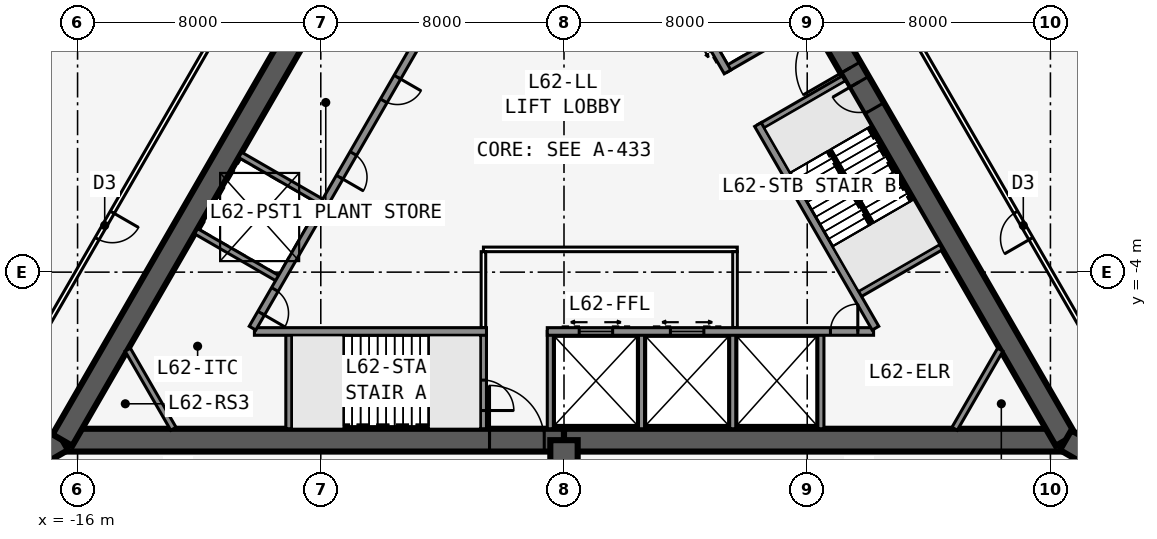
"""IFC4 building model, lengths in metres.
Left out: names, types, materials, properties, quantities, classifications, styles, units other than length and angle.
Written with IfcOpenShell. Run it as: python <this file> out.ifc"""

import sys

from ifc_helpers import new_model, si_unit, direction, frame, frame_2d, origin, place, context, subcontext, project, spatial, rectangle, extrude, element, fill, save


model = new_model("IFC4")
c1 = context("Model", 3, precision=1e-05, world=origin(), true_north=direction((0.0, 1.0)))
c2 = subcontext(c1, "Body", "Model", "MODEL_VIEW")
j1 = project(units=[si_unit("LENGTHUNIT", "METRE"), si_unit("PLANEANGLEUNIT", "RADIAN")], contexts=[c1])
p1 = place(None, origin())
s1 = spatial("IfcSite", under=j1, at=p1, CompositionType="ELEMENT")
p2 = place(p1, origin())
s2 = spatial("IfcBuilding", under=s1, at=p2, CompositionType="ELEMENT")
p3 = place(p2, frame((0.0, 0.0, 233.3)))
s3 = spatial("IfcBuildingStorey", under=s2, at=p3, CompositionType="ELEMENT", Elevation=233.3)
p4 = place(p3, frame((-16.5, -9.526, 0.0), z_axis=(0.0, 0.0, 1.0), x_axis=(1.0, 0.0, 0.0)))
e1 = element("IfcWall", 1, at=p4, inside=s3, PredefinedType="SHEAR", context=c2, shape_type="SweptSolid", body=[
    extrude(rectangle(XDim=16.5, YDim=0.75, at=frame_2d((8.25, 0.0))), origin(), (0.0, 0.0, 1.0), 6.0),
])
p5 = place(p4, frame((14.05, 0.0, 0.0)))
e2 = element("IfcOpeningElement", 2, at=p5, cuts=e1, PredefinedType="OPENING", context=c2, shape_type="SweptSolid", body=[
    extrude(rectangle(XDim=1.8, YDim=2.13, at=frame_2d((0.9, 1.065))), frame((0.0, 0.385, 0.0), z_axis=(0.0, -1.0, 0.0), x_axis=(1.0, 0.0, 0.0)), (0.0, 0.0, 1.0), 0.77),
])
p6 = place(p3, frame((0.0, -9.526, 0.0), z_axis=(0.0, 0.0, 1.0), x_axis=(1.0, 0.0, 0.0)))
e3 = element("IfcWall", 3, at=p6, inside=s3, PredefinedType="SHEAR", context=c2, shape_type="SweptSolid", body=[
    extrude(rectangle(XDim=16.5, YDim=0.75, at=frame_2d((8.25, 0.0))), origin(), (0.0, 0.0, 1.0), 6.0),
])
p7 = place(p3, frame((-10.183, -5.951, 0.0), z_axis=(0.0, 0.0, 1.0), x_axis=(1.0, 0.0, 0.0)))
e4 = element("IfcWall", 4, at=p7, inside=s3, PredefinedType="SOLIDWALL", context=c2, shape_type="SweptSolid", body=[
    extrude(rectangle(XDim=7.633, YDim=0.25, at=frame_2d((3.816, 0.0))), origin(), (0.0, 0.0, 1.0), 5.75),
])
p8 = place(p3, frame((-0.55, -5.951, 0.0), z_axis=(0.0, 0.0, 1.0), x_axis=(1.0, 0.0, 0.0)))
e5 = element("IfcWall", 5, at=p8, inside=s3, PredefinedType="SOLIDWALL", context=c2, shape_type="SweptSolid", body=[
    extrude(rectangle(XDim=10.733, YDim=0.25, at=frame_2d((5.366, 0.0))), origin(), (0.0, 0.0, 1.0), 5.75),
])
p9 = place(p8, frame((9.314, 0.0, 0.0)))
e6 = element("IfcOpeningElement", 6, at=p9, cuts=e5, PredefinedType="OPENING", context=c2, shape_type="SweptSolid", body=[
    extrude(rectangle(XDim=0.9, YDim=2.13, at=frame_2d((0.45, 1.065))), frame((0.0, 0.135, 0.0), z_axis=(0.0, -1.0, 0.0), x_axis=(1.0, 0.0, 0.0)), (0.0, 0.0, 1.0), 0.27),
])
p10 = place(p8, frame((1.05, 0.0, 0.0)))
e7 = element("IfcOpeningElement", 7, at=p10, cuts=e5, PredefinedType="OPENING", context=c2, shape_type="SweptSolid", body=[
    extrude(rectangle(XDim=1.1, YDim=2.13, at=frame_2d((0.55, 1.065))), frame((0.0, 0.135, 0.0), z_axis=(0.0, -1.0, 0.0), x_axis=(1.0, 0.0, 0.0)), (0.0, 0.0, 1.0), 0.27),
])
p11 = place(p8, frame((4.05, 0.0, 0.0)))
e8 = element("IfcOpeningElement", 8, at=p11, cuts=e5, PredefinedType="OPENING", context=c2, shape_type="SweptSolid", body=[
    extrude(rectangle(XDim=1.1, YDim=2.13, at=frame_2d((0.55, 1.065))), frame((0.0, 0.135, 0.0), z_axis=(0.0, -1.0, 0.0), x_axis=(1.0, 0.0, 0.0)), (0.0, 0.0, 1.0), 0.27),
])
p12 = place(p3, frame((-9.05, -5.951, 0.0), z_axis=(0.0, 0.0, 1.0), x_axis=(0.0, -1.0, 0.0)))
e9 = element("IfcWall", 9, at=p12, inside=s3, PredefinedType="SOLIDWALL", context=c2, shape_type="SweptSolid", body=[
    extrude(rectangle(XDim=3.2, YDim=0.2, at=frame_2d((1.6, 0.0))), origin(), (0.0, 0.0, 1.0), 5.75),
])
p13 = place(p3, frame((-2.65, -5.951, 0.0), z_axis=(0.0, 0.0, 1.0), x_axis=(0.0, -1.0, 0.0)))
e10 = element("IfcWall", 10, at=p13, inside=s3, PredefinedType="SOLIDWALL", context=c2, shape_type="SweptSolid", body=[
    extrude(rectangle(XDim=3.2, YDim=0.2, at=frame_2d((1.6, 0.0))), origin(), (0.0, 0.0, 1.0), 5.75),
])
p14 = place(p13, frame((1.6, 0.0, 0.0)))
e11 = element("IfcOpeningElement", 11, at=p14, cuts=e10, PredefinedType="OPENING", context=c2, shape_type="SweptSolid", body=[
    extrude(rectangle(XDim=1.0, YDim=2.13, at=frame_2d((0.5, 1.065))), frame((0.0, 0.11, 0.0), z_axis=(0.0, -1.0, 0.0), x_axis=(1.0, 0.0, 0.0)), (0.0, 0.0, 1.0), 0.22),
])
for number, where, z_axis, x_axis in (
    (12, (-0.45, -5.951, 0.0), (0.0, 0.0, 1.0), (0.0, -1.0, 0.0)),
    (13, (2.55, -5.951, 0.0), (0.0, 0.0, 1.0), (0.0, -1.0, 0.0)),
    (14, (5.55, -5.951, 0.0), (0.0, 0.0, 1.0), (0.0, -1.0, 0.0)),
    (15, (8.45, -5.951, 0.0), (0.0, 0.0, 1.0), (0.0, -1.0, 0.0)),
):
    element("IfcWall", number, at=place(p3, frame(where, z_axis=z_axis, x_axis=x_axis)), inside=s3, PredefinedType="SOLIDWALL", context=c2, shape_type="SweptSolid", body=[
        extrude(rectangle(XDim=3.2, YDim=0.2, at=frame_2d((1.6, 0.0))), origin(), (0.0, 0.0, 1.0), 5.75),
    ])
p15 = place(p3, frame((16.5, -9.526, 0.0), z_axis=(0.0, 0.0, 1.0), x_axis=(-0.499996545922, 0.866027397988, 0.0)))
e16 = element("IfcWall", 16, at=p15, inside=s3, PredefinedType="SHEAR", context=c2, shape_type="SweptSolid", body=[
    extrude(rectangle(XDim=16.5, YDim=0.75, at=frame_2d((8.25, 0.0))), origin(), (0.0, 0.0, 1.0), 6.0),
])
p16 = place(p15, frame((14.15, 0.0, 0.0)))
e17 = element("IfcOpeningElement", 17, at=p16, cuts=e16, PredefinedType="OPENING", context=c2, shape_type="SweptSolid", body=[
    extrude(rectangle(XDim=1.8, YDim=2.13, at=frame_2d((0.9, 1.065))), frame((0.0, 0.385, 0.0), z_axis=(0.0, -1.0, 0.0), x_axis=(1.0, 0.0, 0.0)), (0.0, 0.0, 1.0), 0.77),
])
p17 = place(p15, frame((12.6, 0.0, 0.0)))
e18 = element("IfcOpeningElement", 18, at=p17, cuts=e16, PredefinedType="OPENING", context=c2, shape_type="SweptSolid", body=[
    extrude(rectangle(XDim=1.0, YDim=2.13, at=frame_2d((0.5, 1.065))), frame((0.0, 0.385, 0.0), z_axis=(0.0, -1.0, 0.0), x_axis=(1.0, 0.0, 0.0)), (0.0, 0.0, 1.0), 0.77),
])
p18 = place(p3, frame((10.245, -5.843, 0.0), z_axis=(0.0, 0.0, 1.0), x_axis=(-0.499993009313, 0.866029439822, 0.0)))
e19 = element("IfcWall", 19, at=p18, inside=s3, PredefinedType="SOLIDWALL", context=c2, shape_type="SweptSolid", body=[
    extrude(rectangle(XDim=7.733, YDim=0.25, at=frame_2d((3.866, 0.0))), origin(), (0.0, 0.0, 1.0), 5.75),
])
p19 = place(p3, frame((5.379, 2.586, 0.0), z_axis=(0.0, 0.0, 1.0), x_axis=(-0.500001375892, 0.866024609411, 0.0)))
e20 = element("IfcWall", 20, at=p19, inside=s3, PredefinedType="SOLIDWALL", context=c2, shape_type="SweptSolid", body=[
    extrude(rectangle(XDim=10.633, YDim=0.25, at=frame_2d((5.316, 0.0))), origin(), (0.0, 0.0, 1.0), 5.75),
])
p20 = place(p19, frame((9.164, 0.0, 0.0)))
e21 = element("IfcOpeningElement", 21, at=p20, cuts=e20, PredefinedType="OPENING", context=c2, shape_type="SweptSolid", body=[
    extrude(rectangle(XDim=0.9, YDim=2.13, at=frame_2d((0.45, 1.065))), frame((0.0, 0.135, 0.0), z_axis=(0.0, -1.0, 0.0), x_axis=(1.0, 0.0, 0.0)), (0.0, 0.0, 1.0), 0.27),
])
p21 = place(p19, frame((1.0, 0.0, 0.0)))
e22 = element("IfcOpeningElement", 22, at=p21, cuts=e20, PredefinedType="OPENING", context=c2, shape_type="SweptSolid", body=[
    extrude(rectangle(XDim=1.1, YDim=2.13, at=frame_2d((0.55, 1.065))), frame((0.0, 0.135, 0.0), z_axis=(0.0, -1.0, 0.0), x_axis=(1.0, 0.0, 0.0)), (0.0, 0.0, 1.0), 0.27),
])
p22 = place(p19, frame((3.9, 0.0, 0.0)))
e23 = element("IfcOpeningElement", 23, at=p22, cuts=e20, PredefinedType="OPENING", context=c2, shape_type="SweptSolid", body=[
    extrude(rectangle(XDim=1.1, YDim=2.13, at=frame_2d((0.55, 1.065))), frame((0.0, 0.135, 0.0), z_axis=(0.0, -1.0, 0.0), x_axis=(1.0, 0.0, 0.0)), (0.0, 0.0, 1.0), 0.27),
])
p23 = place(p19, frame((6.8, 0.0, 0.0)))
e24 = element("IfcOpeningElement", 24, at=p23, cuts=e20, PredefinedType="OPENING", context=c2, shape_type="SweptSolid", body=[
    extrude(rectangle(XDim=1.1, YDim=2.13, at=frame_2d((0.55, 1.065))), frame((0.0, 0.135, 0.0), z_axis=(0.0, -1.0, 0.0), x_axis=(1.0, 0.0, 0.0)), (0.0, 0.0, 1.0), 0.27),
])
for number, where, z_axis, x_axis in (
    (25, (9.629, -4.775, 0.0), (0.0, 0.0, 1.0), (0.866, 0.5, 0.0)),
    (26, (6.429, 0.767, 0.0), (0.0, 0.0, 1.0), (0.866, 0.5, 0.0)),
):
    element("IfcWall", number, at=place(p3, frame(where, z_axis=z_axis, x_axis=x_axis)), inside=s3, PredefinedType="SOLIDWALL", context=c2, shape_type="SweptSolid", body=[
        extrude(rectangle(XDim=3.2, YDim=0.2, at=frame_2d((1.6, 0.0))), origin(), (0.0, 0.0, 1.0), 5.75),
    ])
p24 = place(p3, frame((5.329, 2.673, 0.0), z_axis=(0.0, 0.0, 1.0), x_axis=(0.866022944154, 0.50000426018, 0.0)))
e27 = element("IfcWall", 27, at=p24, inside=s3, PredefinedType="SOLIDWALL", context=c2, shape_type="SweptSolid", body=[
    extrude(rectangle(XDim=3.2, YDim=0.2, at=frame_2d((1.6, 0.0))), origin(), (0.0, 0.0, 1.0), 5.75),
])
p25 = place(p3, frame((-8.25, 4.763, 0.0), z_axis=(0.0, 0.0, 1.0), x_axis=(-0.499996545922, -0.866027397988, 0.0)))
e28 = element("IfcWall", 28, at=p25, inside=s3, PredefinedType="SHEAR", context=c2, shape_type="SweptSolid", body=[
    extrude(rectangle(XDim=16.5, YDim=0.75, at=frame_2d((8.25, 0.0))), origin(), (0.0, 0.0, 1.0), 6.0),
])
p26 = place(p3, frame((-4.929, 3.365, 0.0), z_axis=(0.0, 0.0, 1.0), x_axis=(-0.499991433582, -0.866030349552, 0.0)))
e29 = element("IfcWall", 29, at=p26, inside=s3, PredefinedType="SOLIDWALL", context=c2, shape_type="SweptSolid", body=[
    extrude(rectangle(XDim=10.633, YDim=0.25, at=frame_2d((5.316, 0.0))), origin(), (0.0, 0.0, 1.0), 5.75),
])
p27 = place(p26, frame((9.164, 0.0, 0.0)))
e30 = element("IfcOpeningElement", 30, at=p27, cuts=e29, PredefinedType="OPENING", context=c2, shape_type="SweptSolid", body=[
    extrude(rectangle(XDim=0.9, YDim=2.13, at=frame_2d((0.45, 1.065))), frame((0.0, 0.135, 0.0), z_axis=(0.0, -1.0, 0.0), x_axis=(1.0, 0.0, 0.0)), (0.0, 0.0, 1.0), 0.27),
])
p28 = place(p26, frame((1.1, 0.0, 0.0)))
e31 = element("IfcOpeningElement", 31, at=p28, cuts=e29, PredefinedType="OPENING", context=c2, shape_type="SweptSolid", body=[
    extrude(rectangle(XDim=0.9, YDim=2.13, at=frame_2d((0.45, 1.065))), frame((0.0, 0.135, 0.0), z_axis=(0.0, -1.0, 0.0), x_axis=(1.0, 0.0, 0.0)), (0.0, 0.0, 1.0), 0.27),
])
p29 = place(p26, frame((4.0, 0.0, 0.0)))
e32 = element("IfcOpeningElement", 32, at=p29, cuts=e29, PredefinedType="OPENING", context=c2, shape_type="SweptSolid", body=[
    extrude(rectangle(XDim=0.9, YDim=2.13, at=frame_2d((0.45, 1.065))), frame((0.0, 0.135, 0.0), z_axis=(0.0, -1.0, 0.0), x_axis=(1.0, 0.0, 0.0)), (0.0, 0.0, 1.0), 0.27),
])
for number, where, z_axis, x_axis in (
    (33, (-4.979, 3.279, 0.0), (0.0, 0.0, 1.0), (-0.866, 0.5, 0.0)),
    (34, (-7.879, -1.744, 0.0), (0.0, 0.0, 1.0), (-0.866, 0.5, 0.0)),
):
    element("IfcWall", number, at=place(p3, frame(where, z_axis=z_axis, x_axis=x_axis)), inside=s3, PredefinedType="SOLIDWALL", context=c2, shape_type="SweptSolid", body=[
        extrude(rectangle(XDim=3.2, YDim=0.2, at=frame_2d((1.6, 0.0))), origin(), (0.0, 0.0, 1.0), 5.75),
    ])
p30 = place(p3, frame((-9.329, -4.256, 0.0), z_axis=(0.0, 0.0, 1.0), x_axis=(-0.866022944154, 0.50000426018, 0.0)))
e35 = element("IfcWall", 35, at=p30, inside=s3, PredefinedType="SOLIDWALL", context=c2, shape_type="SweptSolid", body=[
    extrude(rectangle(XDim=3.2, YDim=0.2, at=frame_2d((1.6, 0.0))), origin(), (0.0, 0.0, 1.0), 5.75),
])
p31 = place(p3, frame((16.5, -9.526, 0.0), z_axis=(0.0, 0.0, 1.0), x_axis=(0.866031398331, -0.499989616998, 0.0)))
e36 = element("IfcWall", 36, at=p31, inside=s3, PredefinedType="SHEAR", context=c2, shape_type="SweptSolid", body=[
    extrude(rectangle(XDim=4.746, YDim=0.75, at=frame_2d((2.373, 0.0))), origin(), (0.0, 0.0, 1.0), 6.0),
])
p32 = place(p31, frame((1.725, 0.0, 0.0)))
e37 = element("IfcOpeningElement", 37, at=p32, cuts=e36, PredefinedType="OPENING", context=c2, shape_type="SweptSolid", body=[
    extrude(rectangle(XDim=1.8, YDim=2.13, at=frame_2d((0.9, 1.065))), frame((0.0, 0.385, 0.0), z_axis=(0.0, -1.0, 0.0), x_axis=(1.0, 0.0, 0.0)), (0.0, 0.0, 1.0), 0.77),
])
p33 = place(p3, frame((-16.5, -9.526, 0.0), z_axis=(0.0, 0.0, 1.0), x_axis=(-0.866031398331, -0.499989616998, 0.0)))
e38 = element("IfcWall", 38, at=p33, inside=s3, PredefinedType="SHEAR", context=c2, shape_type="SweptSolid", body=[
    extrude(rectangle(XDim=4.746, YDim=0.75, at=frame_2d((2.373, 0.0))), origin(), (0.0, 0.0, 1.0), 6.0),
])
p34 = place(p33, frame((1.725, 0.0, 0.0)))
e39 = element("IfcOpeningElement", 39, at=p34, cuts=e38, PredefinedType="OPENING", context=c2, shape_type="SweptSolid", body=[
    extrude(rectangle(XDim=1.8, YDim=2.13, at=frame_2d((0.9, 1.065))), frame((0.0, 0.385, 0.0), z_axis=(0.0, -1.0, 0.0), x_axis=(1.0, 0.0, 0.0)), (0.0, 0.0, 1.0), 0.77),
])
p35 = place(p3, frame((0.0, -9.526, 0.0), z_axis=(0.0, 0.0, 1.0), x_axis=(0.0, -1.0, 0.0)))
e40 = element("IfcWall", 40, at=p35, inside=s3, PredefinedType="SHEAR", context=c2, shape_type="SweptSolid", body=[
    extrude(rectangle(XDim=8.154, YDim=0.9, at=frame_2d((4.077, 0.0))), origin(), (0.0, 0.0, 1.0), 6.0),
])
p36 = place(p3, frame((20.102, -11.115, 0.0), z_axis=(0.0, 0.0, 1.0), x_axis=(-0.500000265775, 0.866025250339, 0.0)))
e41 = element("IfcWall", 41, at=p36, inside=s3, PredefinedType="PARTITIONING", context=c2, shape_type="SweptSolid", body=[
    extrude(rectangle(XDim=39.354, YDim=0.15, at=frame_2d((19.677, 0.0))), origin(), (0.0, 0.0, 1.0), 5.75),
])
p37 = place(p36, frame((9.489, 0.0, 0.0)))
e42 = element("IfcOpeningElement", 42, at=p37, cuts=e41, PredefinedType="OPENING", context=c2, shape_type="SweptSolid", body=[
    extrude(rectangle(XDim=1.0, YDim=2.13, at=frame_2d((0.5, 1.065))), frame((0.0, 0.085, 0.0), z_axis=(0.0, -1.0, 0.0), x_axis=(1.0, 0.0, 0.0)), (0.0, 0.0, 1.0), 0.17),
])
p38 = place(p36, frame((21.177, 0.0, 0.0)))
e43 = element("IfcOpeningElement", 43, at=p38, cuts=e41, PredefinedType="OPENING", context=c2, shape_type="SweptSolid", body=[
    extrude(rectangle(XDim=1.0, YDim=2.13, at=frame_2d((0.5, 1.065))), frame((0.0, 0.085, 0.0), z_axis=(0.0, -1.0, 0.0), x_axis=(1.0, 0.0, 0.0)), (0.0, 0.0, 1.0), 0.17),
])
p39 = place(p36, frame((30.865, 0.0, 0.0)))
e44 = element("IfcOpeningElement", 44, at=p39, cuts=e41, PredefinedType="OPENING", context=c2, shape_type="SweptSolid", body=[
    extrude(rectangle(XDim=1.0, YDim=2.13, at=frame_2d((0.5, 1.065))), frame((0.0, 0.085, 0.0), z_axis=(0.0, -1.0, 0.0), x_axis=(1.0, 0.0, 0.0)), (0.0, 0.0, 1.0), 0.17),
])
p40 = place(p3, frame((-0.425, 22.966, 0.0), z_axis=(0.0, 0.0, 1.0), x_axis=(-0.500000265775, -0.866025250339, 0.0)))
e45 = element("IfcWall", 45, at=p40, inside=s3, PredefinedType="PARTITIONING", context=c2, shape_type="SweptSolid", body=[
    extrude(rectangle(XDim=39.354, YDim=0.15, at=frame_2d((19.677, 0.0))), origin(), (0.0, 0.0, 1.0), 5.75),
])
p41 = place(p40, frame((7.489, 0.0, 0.0)))
e46 = element("IfcOpeningElement", 46, at=p41, cuts=e45, PredefinedType="OPENING", context=c2, shape_type="SweptSolid", body=[
    extrude(rectangle(XDim=1.0, YDim=2.13, at=frame_2d((0.5, 1.065))), frame((0.0, 0.085, 0.0), z_axis=(0.0, -1.0, 0.0), x_axis=(1.0, 0.0, 0.0)), (0.0, 0.0, 1.0), 0.17),
])
p42 = place(p40, frame((17.177, 0.0, 0.0)))
e47 = element("IfcOpeningElement", 47, at=p42, cuts=e45, PredefinedType="OPENING", context=c2, shape_type="SweptSolid", body=[
    extrude(rectangle(XDim=1.0, YDim=2.13, at=frame_2d((0.5, 1.065))), frame((0.0, 0.085, 0.0), z_axis=(0.0, -1.0, 0.0), x_axis=(1.0, 0.0, 0.0)), (0.0, 0.0, 1.0), 0.17),
])
p43 = place(p40, frame((28.865, 0.0, 0.0)))
e48 = element("IfcOpeningElement", 48, at=p43, cuts=e45, PredefinedType="OPENING", context=c2, shape_type="SweptSolid", body=[
    extrude(rectangle(XDim=1.0, YDim=2.13, at=frame_2d((0.5, 1.065))), frame((0.0, 0.085, 0.0), z_axis=(0.0, -1.0, 0.0), x_axis=(1.0, 0.0, 0.0)), (0.0, 0.0, 1.0), 0.17),
])
p44 = place(p3, frame((-2.65, -3.251, 0.0), z_axis=(0.0, 0.0, 1.0), x_axis=(1.0, 0.0, 0.0)))
e49 = element("IfcWall", 49, at=p44, inside=s3, PredefinedType="PARTITIONING", context=c2, shape_type="SweptSolid", body=[
    extrude(rectangle(XDim=8.35, YDim=0.15, at=frame_2d((4.175, 0.0))), origin(), (0.0, 0.0, 1.0), 5.75),
])
for number, where, z_axis, x_axis in (
    (50, (-2.65, -5.826, 0.0), (0.0, 0.0, 1.0), (0.0, 1.0, 0.0)),
    (51, (5.625, -5.826, 0.0), (0.0, 0.0, 1.0), (0.0, 1.0, 0.0)),
):
    element("IfcWall", number, at=place(p3, frame(where, z_axis=z_axis, x_axis=x_axis)), inside=s3, PredefinedType="PARTITIONING", context=c2, shape_type="SweptSolid", body=[
        extrude(rectangle(XDim=2.5, YDim=0.15, at=frame_2d((1.25, 0.0))), origin(), (0.0, 0.0, 1.0), 5.75),
    ])
for number, where, z_axis, x_axis in (
    (52, (14.349, -6.551, 0.0), (0.0, 0.0, 1.0), (-0.5, -0.866, 0.0)),
    (53, (-12.848, -9.151, 0.0), (0.0, 0.0, 1.0), (-0.5, 0.866, 0.0)),
):
    element("IfcWall", number, at=place(p3, frame(where, z_axis=z_axis, x_axis=x_axis)), inside=s3, PredefinedType="SOLIDWALL", context=c2, shape_type="SweptSolid", body=[
        extrude(rectangle(XDim=3.002, YDim=0.2, at=frame_2d((1.501, 0.0))), origin(), (0.0, 0.0, 1.0), 5.75),
    ])
p45 = place(p3, frame((-7.247, -7.576, 0.0), z_axis=(0.0, 0.0, 1.0), x_axis=(1.0, 0.0, 0.0)))
e54 = element("IfcWall", 54, at=p45, inside=s3, PredefinedType="SOLIDWALL", context=c2, shape_type="SweptSolid", body=[
    extrude(rectangle(XDim=2.794, YDim=0.1, at=frame_2d((1.397, 0.0))), origin(), (0.0, 0.0, 1.0), 6.0),
])
p46 = place(p3, frame((10.135, -2.401, 0.0), z_axis=(0.0, 0.0, 1.0), x_axis=(-0.499992232847, 0.866029888106, 0.0)))
e55 = element("IfcWall", 55, at=p46, inside=s3, PredefinedType="SOLIDWALL", context=c2, shape_type="SweptSolid", body=[
    extrude(rectangle(XDim=2.794, YDim=0.1, at=frame_2d((1.397, 0.0))), origin(), (0.0, 0.0, 1.0), 6.0),
])
p47 = place(p37, origin())
e56 = element("IfcDoor", 56, at=p47, inside=s3, OperationType="SINGLE_SWING_LEFT", PredefinedType="DOOR", context=c2, shape_type="SweptSolid", body=[
    extrude(rectangle(XDim=1.0, YDim=2.13, at=frame_2d((0.5, 1.065))), frame((0.0, 0.025, 0.0), z_axis=(0.0, -1.0, 0.0), x_axis=(1.0, 0.0, 0.0)), (0.0, 0.0, 1.0), 0.05),
])
fill(e42, e56)
p48 = place(p43, origin())
e57 = element("IfcDoor", 57, at=p48, inside=s3, OperationType="SINGLE_SWING_LEFT", PredefinedType="DOOR", context=c2, shape_type="SweptSolid", body=[
    extrude(rectangle(XDim=1.0, YDim=2.13, at=frame_2d((0.5, 1.065))), frame((0.0, 0.025, 0.0), z_axis=(0.0, -1.0, 0.0), x_axis=(1.0, 0.0, 0.0)), (0.0, 0.0, 1.0), 0.05),
])
fill(e48, e57)
p49 = place(p5, origin())
e58 = element("IfcDoor", 58, at=p49, inside=s3, OperationType="DOUBLE_DOOR_SINGLE_SWING", PredefinedType="DOOR", context=c2, shape_type="SweptSolid", body=[
    extrude(rectangle(XDim=1.8, YDim=2.13, at=frame_2d((0.9, 1.065))), frame((0.0, 0.025, 0.0), z_axis=(0.0, -1.0, 0.0), x_axis=(1.0, 0.0, 0.0)), (0.0, 0.0, 1.0), 0.05),
])
fill(e2, e58)
p50 = place(p14, origin())
e59 = element("IfcDoor", 59, at=p50, inside=s3, OperationType="SINGLE_SWING_RIGHT", PredefinedType="DOOR", context=c2, shape_type="SweptSolid", body=[
    extrude(rectangle(XDim=1.0, YDim=2.13, at=frame_2d((0.5, 1.065))), frame((0.0, 0.025, 0.0), z_axis=(0.0, -1.0, 0.0), x_axis=(1.0, 0.0, 0.0)), (0.0, 0.0, 1.0), 0.05),
])
fill(e11, e59)
p51 = place(p16, origin())
e60 = element("IfcDoor", 60, at=p51, inside=s3, OperationType="DOUBLE_DOOR_SINGLE_SWING", PredefinedType="DOOR", context=c2, shape_type="SweptSolid", body=[
    extrude(rectangle(XDim=1.8, YDim=2.13, at=frame_2d((0.9, 1.065))), frame((0.0, 0.025, 0.0), z_axis=(0.0, -1.0, 0.0), x_axis=(1.0, 0.0, 0.0)), (0.0, 0.0, 1.0), 0.05),
])
fill(e17, e60)
p52 = place(p17, origin())
e61 = element("IfcDoor", 61, at=p52, inside=s3, OperationType="SINGLE_SWING_RIGHT", PredefinedType="DOOR", context=c2, shape_type="SweptSolid", body=[
    extrude(rectangle(XDim=1.0, YDim=2.13, at=frame_2d((0.5, 1.065))), frame((0.0, 0.025, 0.0), z_axis=(0.0, -1.0, 0.0), x_axis=(1.0, 0.0, 0.0)), (0.0, 0.0, 1.0), 0.05),
])
fill(e18, e61)
p53 = place(p9, origin())
e62 = element("IfcDoor", 62, at=p53, inside=s3, OperationType="SINGLE_SWING_RIGHT", PredefinedType="DOOR", context=c2, shape_type="SweptSolid", body=[
    extrude(rectangle(XDim=0.9, YDim=2.13, at=frame_2d((0.45, 1.065))), frame((0.0, 0.025, 0.0), z_axis=(0.0, -1.0, 0.0), x_axis=(1.0, 0.0, 0.0)), (0.0, 0.0, 1.0), 0.05),
])
fill(e6, e62)
p54 = place(p27, origin())
e63 = element("IfcDoor", 63, at=p54, inside=s3, OperationType="SINGLE_SWING_RIGHT", PredefinedType="DOOR", context=c2, shape_type="SweptSolid", body=[
    extrude(rectangle(XDim=0.9, YDim=2.13, at=frame_2d((0.45, 1.065))), frame((0.0, 0.025, 0.0), z_axis=(0.0, -1.0, 0.0), x_axis=(1.0, 0.0, 0.0)), (0.0, 0.0, 1.0), 0.05),
])
fill(e30, e63)
p55 = place(p28, origin())
e64 = element("IfcDoor", 64, at=p55, inside=s3, OperationType="SINGLE_SWING_LEFT", PredefinedType="DOOR", context=c2, shape_type="SweptSolid", body=[
    extrude(rectangle(XDim=0.9, YDim=2.13, at=frame_2d((0.45, 1.065))), frame((0.0, 0.025, 0.0), z_axis=(0.0, -1.0, 0.0), x_axis=(1.0, 0.0, 0.0)), (0.0, 0.0, 1.0), 0.05),
])
fill(e31, e64)
p56 = place(p29, origin())
e65 = element("IfcDoor", 65, at=p56, inside=s3, OperationType="SINGLE_SWING_RIGHT", PredefinedType="DOOR", context=c2, shape_type="SweptSolid", body=[
    extrude(rectangle(XDim=0.9, YDim=2.13, at=frame_2d((0.45, 1.065))), frame((0.0, 0.025, 0.0), z_axis=(0.0, -1.0, 0.0), x_axis=(1.0, 0.0, 0.0)), (0.0, 0.0, 1.0), 0.05),
])
fill(e32, e65)
p57 = place(p10, origin())
e66 = element("IfcDoor", 66, at=p57, inside=s3, OperationType="DOUBLE_DOOR_SLIDING", PredefinedType="USERDEFINED", context=c2, shape_type="SweptSolid", body=[
    extrude(rectangle(XDim=1.1, YDim=2.13, at=frame_2d((0.55, 1.065))), frame((0.0, 0.025, 0.0), z_axis=(0.0, -1.0, 0.0), x_axis=(1.0, 0.0, 0.0)), (0.0, 0.0, 1.0), 0.05),
])
fill(e7, e66)
p58 = place(p11, origin())
e67 = element("IfcDoor", 67, at=p58, inside=s3, OperationType="DOUBLE_DOOR_SLIDING", PredefinedType="USERDEFINED", context=c2, shape_type="SweptSolid", body=[
    extrude(rectangle(XDim=1.1, YDim=2.13, at=frame_2d((0.55, 1.065))), frame((0.0, 0.025, 0.0), z_axis=(0.0, -1.0, 0.0), x_axis=(1.0, 0.0, 0.0)), (0.0, 0.0, 1.0), 0.05),
])
fill(e8, e67)
save(model, sys.argv[1])
